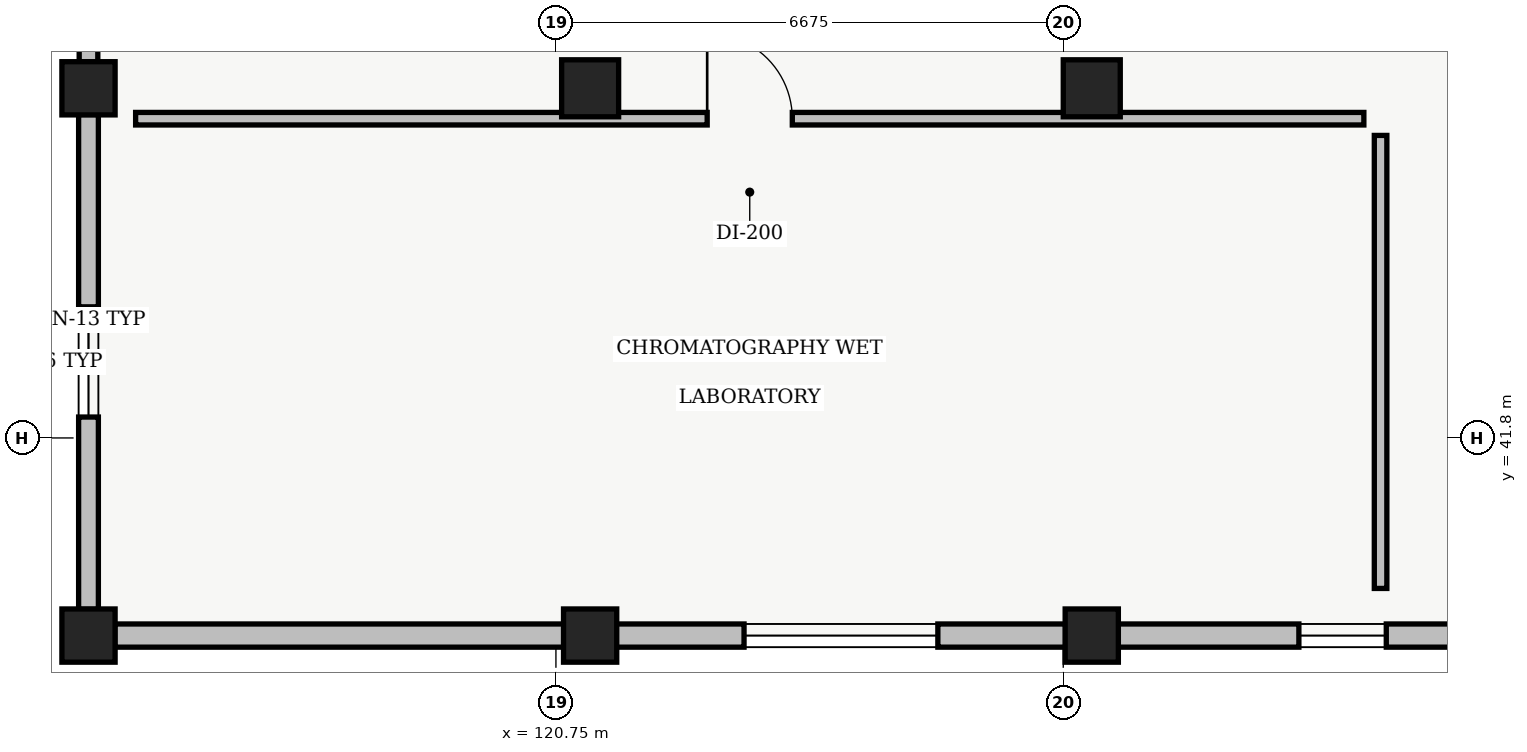
"""IFC4 building model, lengths in metres.
Left out: names, types, materials, properties, quantities, classifications, styles, units other than length and angle.
Written with IfcOpenShell. Run it as: python <this file> out.ifc"""

import sys

from ifc_helpers import new_model, si_unit, direction, frame, frame_2d, origin, origin_2d, place, context, subcontext, project, spatial, rectangle, extrude, element, fill, save


model = new_model("IFC4")
c1 = context("Model", 3, precision=1e-05, world=origin(), true_north=direction((0.0, 1.0)))
c2 = subcontext(c1, "Body", "Model", "MODEL_VIEW")
j1 = project(units=[si_unit("LENGTHUNIT", "METRE"), si_unit("PLANEANGLEUNIT", "RADIAN")], contexts=[c1])
p1 = place(None, origin())
s1 = spatial("IfcSite", under=j1, at=p1, CompositionType="ELEMENT")
p2 = place(p1, origin())
s2 = spatial("IfcBuilding", under=s1, at=p2, CompositionType="ELEMENT")
p3 = place(p2, frame((0.0, 0.0, 5.1)))
s3 = spatial("IfcBuildingStorey", under=s2, at=p3, CompositionType="ELEMENT", Elevation=5.1)
for number, where, z_axis, x_axis in (
    (1, (114.6, 39.2, 0.0), (0.0, 0.0, 1.0), (1.0, 0.0, 0.0)),
    (2, (114.6, 46.4, 0.0), (0.0, 0.0, 1.0), (1.0, 0.0, 0.0)),
    (3, (121.2, 39.2, 0.0), (0.0, 0.0, 1.0), (1.0, 0.0, 0.0)),
):
    element("IfcColumn", number, at=place(p3, frame(where, z_axis=z_axis, x_axis=x_axis)), inside=s3, PredefinedType="COLUMN", context=c2, shape_type="SweptSolid", body=[
        extrude(rectangle(XDim=0.7, YDim=0.7, at=origin_2d()), origin(), (0.0, 0.0, 1.0), 4.29),
    ])
p4 = place(p3, frame((121.2, 46.4, 0.0), z_axis=(0.0, 0.0, 1.0), x_axis=(1.0, 0.0, 0.0)))
e4 = element("IfcColumn", 4, at=p4, inside=s3, PredefinedType="COLUMN", context=c2, shape_type="SweptSolid", body=[
    extrude(rectangle(XDim=0.75, YDim=0.75, at=origin_2d()), origin(), (0.0, 0.0, 1.0), 4.29),
])
p5 = place(p3, frame((127.8, 39.2, 0.0), z_axis=(0.0, 0.0, 1.0), x_axis=(1.0, 0.0, 0.0)))
e5 = element("IfcColumn", 5, at=p5, inside=s3, PredefinedType="COLUMN", context=c2, shape_type="SweptSolid", body=[
    extrude(rectangle(XDim=0.7, YDim=0.7, at=origin_2d()), origin(), (0.0, 0.0, 1.0), 4.29),
])
p6 = place(p3, frame((127.8, 46.4, 0.0), z_axis=(0.0, 0.0, 1.0), x_axis=(1.0, 0.0, 0.0)))
e6 = element("IfcColumn", 6, at=p6, inside=s3, PredefinedType="COLUMN", context=c2, shape_type="SweptSolid", body=[
    extrude(rectangle(XDim=0.75, YDim=0.75, at=origin_2d()), origin(), (0.0, 0.0, 1.0), 4.29),
])
p7 = place(p3, frame((114.6, 39.545, 0.0), z_axis=(0.0, 0.0, 1.0), x_axis=(0.0, 1.0, 0.0)))
e7 = element("IfcWall", 7, at=p7, inside=s3, PredefinedType="STANDARD", context=c2, shape_type="SweptSolid", body=[
    extrude(rectangle(XDim=6.51, YDim=0.26, at=frame_2d((3.255, 0.0))), origin(), (0.0, 0.0, 1.0), 3.775),
])
p8 = place(p7, frame((2.53, 0.0, 0.95)))
e8 = element("IfcOpeningElement", 8, at=p8, cuts=e7, PredefinedType="OPENING", context=c2, shape_type="SweptSolid", body=[
    extrude(rectangle(XDim=1.45, YDim=1.35, at=frame_2d((0.725, 0.675))), frame((0.0, 0.13, 0.0), z_axis=(0.0, -1.0, 0.0), x_axis=(1.0, 0.0, 0.0)), (0.0, 0.0, 1.0), 0.26),
])
p9 = place(p3, frame((114.6, 46.745, 0.0), z_axis=(0.0, 0.0, 1.0), x_axis=(0.0, 1.0, 0.0)))
e9 = element("IfcWall", 9, at=p9, inside=s3, PredefinedType="STANDARD", context=c2, shape_type="SweptSolid", body=[
    extrude(rectangle(XDim=6.51, YDim=0.245, at=frame_2d((3.255, 0.0))), origin(), (0.0, 0.0, 1.0), 3.775),
])
p10 = place(p9, frame((2.13, 0.0, 0.95)))
e10 = element("IfcOpeningElement", 10, at=p10, cuts=e9, PredefinedType="OPENING", context=c2, shape_type="SweptSolid", body=[
    extrude(rectangle(XDim=2.25, YDim=1.55, at=frame_2d((1.125, 0.775))), frame((0.0, 0.123, 0.0), z_axis=(0.0, -1.0, 0.0), x_axis=(1.0, 0.0, 0.0)), (0.0, 0.0, 1.0), 0.245),
])
p11 = place(p3, frame((134.055, 39.2, 0.0), z_axis=(0.0, 0.0, 1.0), x_axis=(-1.0, 0.0, 0.0)))
e11 = element("IfcWall", 11, at=p11, inside=s3, PredefinedType="STANDARD", context=c2, shape_type="SweptSolid", body=[
    extrude(rectangle(XDim=5.91, YDim=0.305, at=frame_2d((2.955, 0.0))), origin(), (0.0, 0.0, 1.0), 3.775),
])
p12 = place(p11, frame((2.38, 0.0, 0.95)))
e12 = element("IfcOpeningElement", 12, at=p12, cuts=e11, PredefinedType="OPENING", context=c2, shape_type="SweptSolid", body=[
    extrude(rectangle(XDim=1.15, YDim=1.6, at=frame_2d((0.575, 0.8))), frame((0.0, 0.152, 0.0), z_axis=(0.0, -1.0, 0.0), x_axis=(1.0, 0.0, 0.0)), (0.0, 0.0, 1.0), 0.305),
])
p13 = place(p3, frame((127.455, 39.2, 0.0), z_axis=(0.0, 0.0, 1.0), x_axis=(-1.0, 0.0, 0.0)))
e13 = element("IfcWall", 13, at=p13, inside=s3, PredefinedType="STANDARD", context=c2, shape_type="SweptSolid", body=[
    extrude(rectangle(XDim=5.91, YDim=0.305, at=frame_2d((2.955, 0.0))), origin(), (0.0, 0.0, 1.0), 3.775),
])
p14 = place(p13, frame((1.68, 0.0, 0.95)))
e14 = element("IfcOpeningElement", 14, at=p14, cuts=e13, PredefinedType="OPENING", context=c2, shape_type="SweptSolid", body=[
    extrude(rectangle(XDim=2.55, YDim=1.75, at=frame_2d((1.275, 0.875))), frame((0.0, 0.152, 0.0), z_axis=(0.0, -1.0, 0.0), x_axis=(1.0, 0.0, 0.0)), (0.0, 0.0, 1.0), 0.305),
])
p15 = place(p3, frame((120.855, 39.2, 0.0), z_axis=(0.0, 0.0, 1.0), x_axis=(-1.0, 0.0, 0.0)))
e15 = element("IfcWall", 15, at=p15, inside=s3, PredefinedType="STANDARD", context=c2, shape_type="SweptSolid", body=[
    extrude(rectangle(XDim=5.91, YDim=0.305, at=frame_2d((2.955, 0.0))), origin(), (0.0, 0.0, 1.0), 3.775),
])
p16 = place(p3, frame((131.6, 39.82, 0.0), z_axis=(0.0, 0.0, 1.0), x_axis=(0.0, 1.0, 0.0)))
e16 = element("IfcWall", 16, at=p16, inside=s3, PredefinedType="PARTITIONING", context=c2, shape_type="SweptSolid", body=[
    extrude(rectangle(XDim=5.96, YDim=0.165, at=frame_2d((2.98, 0.0))), origin(), (0.0, 0.0, 1.0), 3.95),
])
p17 = place(p3, frame((131.38, 46.0, 0.0), z_axis=(0.0, 0.0, 1.0), x_axis=(-1.0, 0.0, 0.0)))
e17 = element("IfcWall", 17, at=p17, inside=s3, PredefinedType="PARTITIONING", context=c2, shape_type="SweptSolid", body=[
    extrude(rectangle(XDim=16.16, YDim=0.165, at=frame_2d((8.08, 0.0))), origin(), (0.0, 0.0, 1.0), 3.95),
])
p18 = place(p17, frame((7.52, 0.0, 0.0)))
e18 = element("IfcOpeningElement", 18, at=p18, cuts=e17, PredefinedType="OPENING", context=c2, shape_type="SweptSolid", body=[
    extrude(rectangle(XDim=1.12, YDim=2.1, at=frame_2d((0.56, 1.05))), frame((0.0, 0.083, 0.0), z_axis=(0.0, -1.0, 0.0), x_axis=(1.0, 0.0, 0.0)), (0.0, 0.0, 1.0), 0.165),
])
p19 = place(p8, origin())
e19 = element("IfcWindow", 19, at=p19, inside=s3, PartitioningType="SINGLE_PANEL", PredefinedType="WINDOW", context=c2, shape_type="SweptSolid", body=[
    extrude(rectangle(XDim=1.45, YDim=1.35, at=frame_2d((0.725, 0.675))), frame((0.0, 0.03, 0.0), z_axis=(0.0, -1.0, 0.0), x_axis=(1.0, 0.0, 0.0)), (0.0, 0.0, 1.0), 0.06),
])
fill(e8, e19)
p20 = place(p12, origin())
e20 = element("IfcWindow", 20, at=p20, inside=s3, PartitioningType="SINGLE_PANEL", PredefinedType="WINDOW", context=c2, shape_type="SweptSolid", body=[
    extrude(rectangle(XDim=1.15, YDim=1.6, at=frame_2d((0.575, 0.8))), frame((0.0, 0.03, 0.0), z_axis=(0.0, -1.0, 0.0), x_axis=(1.0, 0.0, 0.0)), (0.0, 0.0, 1.0), 0.06),
])
fill(e12, e20)
p21 = place(p14, origin())
e21 = element("IfcWindow", 21, at=p21, inside=s3, PartitioningType="SINGLE_PANEL", PredefinedType="WINDOW", context=c2, shape_type="SweptSolid", body=[
    extrude(rectangle(XDim=2.55, YDim=1.75, at=frame_2d((1.275, 0.875))), frame((0.0, 0.03, 0.0), z_axis=(0.0, -1.0, 0.0), x_axis=(1.0, 0.0, 0.0)), (0.0, 0.0, 1.0), 0.06),
])
fill(e14, e21)
p22 = place(p18, origin())
e22 = element("IfcDoor", 22, at=p22, inside=s3, OperationType="SINGLE_SWING_RIGHT", PredefinedType="DOOR", context=c2, shape_type="SweptSolid", body=[
    extrude(rectangle(XDim=1.12, YDim=2.1, at=frame_2d((0.56, 1.05))), frame((0.0, 0.025, 0.0), z_axis=(0.0, -1.0, 0.0), x_axis=(1.0, 0.0, 0.0)), (0.0, 0.0, 1.0), 0.05),
])
fill(e18, e22)
save(model, sys.argv[1])
